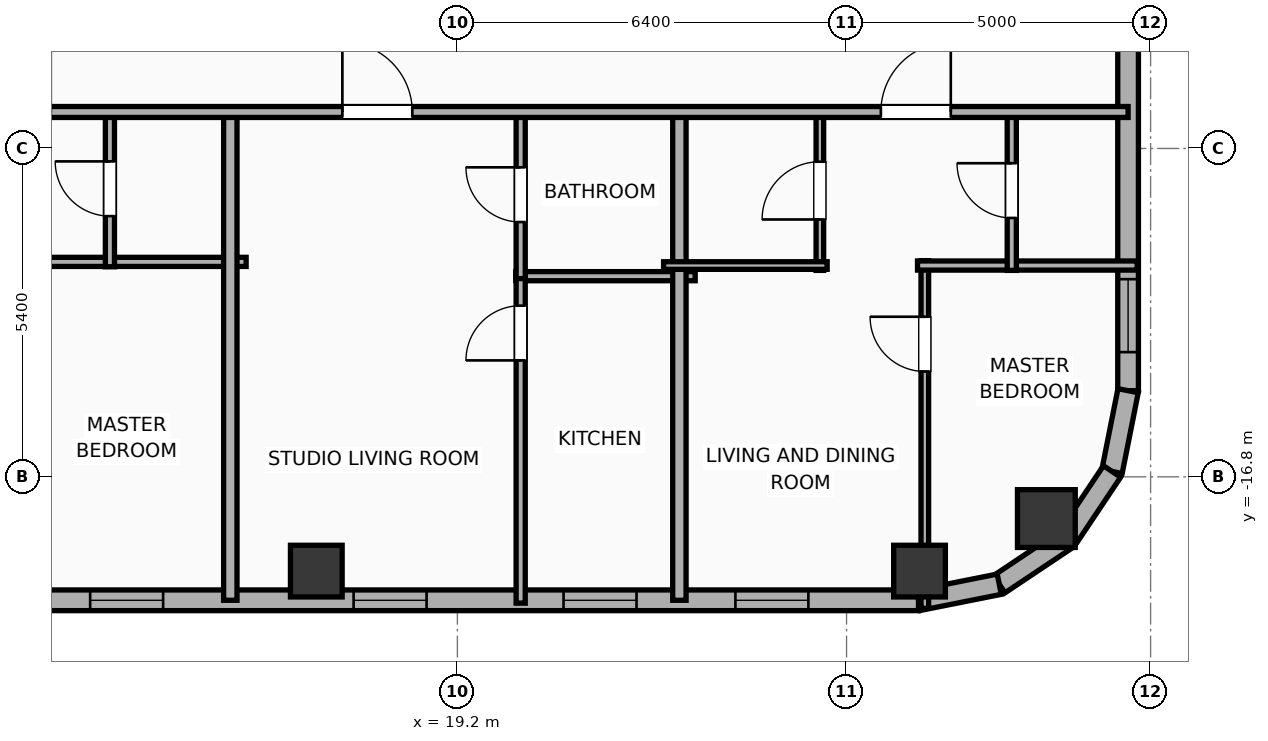
"""IFC4 building model, lengths in metres.
Left out: names, types, materials, properties, quantities, classifications, styles, units other than length and angle.
Written with IfcOpenShell. Run it as: python <this file> out.ifc"""

import sys

from ifc_helpers import new_model, si_unit, direction, frame, frame_2d, origin, origin_2d, place, context, subcontext, project, spatial, rectangle, hollow_rectangle, hollow_circle, extrude, element, fill, save


model = new_model("IFC4")
c1 = context("Model", 3, precision=1e-05, world=origin(), true_north=direction((0.0, 1.0)))
c2 = subcontext(c1, "Body", "Model", "MODEL_VIEW")
j1 = project(units=[si_unit("LENGTHUNIT", "METRE"), si_unit("PLANEANGLEUNIT", "RADIAN")], contexts=[c1])
p1 = place(None, origin())
s1 = spatial("IfcSite", under=j1, at=p1, CompositionType="ELEMENT")
p2 = place(p1, origin())
s2 = spatial("IfcBuilding", under=s1, at=p2, CompositionType="ELEMENT")
p3 = place(p2, frame((0.0, 0.0, 215.8)))
s3 = spatial("IfcBuildingStorey", under=s2, at=p3, CompositionType="ELEMENT", Elevation=215.8)
for number, where, z_axis, x_axis in (
    (1, (16.88, -18.35, 0.0), (0.0, 0.0, 1.0), (1.0, 0.0, 0.0)),
    (2, (26.8, -18.35, 0.0), (0.0, 0.0, 1.0), (1.0, 0.0, 0.0)),
):
    element("IfcColumn", number, at=place(p3, frame(where, z_axis=z_axis, x_axis=x_axis)), inside=s3, PredefinedType="COLUMN", context=c2, shape_type="SweptSolid", body=[
        extrude(hollow_rectangle(XDim=0.85, YDim=0.85, WallThickness=0.028, at=origin_2d()), origin(), (0.0, 0.0, 1.0), 3.9),
    ])
p4 = place(p3, frame((28.886, -17.486, 0.0), z_axis=(0.0, 0.0, 1.0), x_axis=(1.0, 0.0, 0.0)))
e3 = element("IfcColumn", 3, at=p4, inside=s3, PredefinedType="COLUMN", context=c2, shape_type="SweptSolid", body=[
    extrude(hollow_circle(Radius=0.475, WallThickness=0.032, at=origin_2d()), origin(), (0.0, 0.0, 1.0), 3.9),
])
p5 = place(p3, frame((26.783, -18.83, 0.0), z_axis=(0.0, 0.0, 1.0), x_axis=(-1.0, 0.0, 0.0)))
e4 = element("IfcWall", 4, at=p5, inside=s3, PredefinedType="ELEMENTEDWALL", context=c2, shape_type="SweptSolid", body=[
    extrude(rectangle(XDim=49.566, YDim=0.34, at=frame_2d((24.783, 0.0))), origin(), (0.0, 0.0, 1.0), 3.65),
])
p6 = place(p5, frame((23.583, 0.0, 0.75)))
e5 = element("IfcOpeningElement", 5, at=p6, cuts=e4, PredefinedType="OPENING", context=c2, shape_type="SweptSolid", body=[
    extrude(rectangle(XDim=2.4, YDim=2.1, at=frame_2d((1.2, 1.05))), frame((0.0, 0.18, 0.0), z_axis=(0.0, -1.0, 0.0), x_axis=(1.0, 0.0, 0.0)), (0.0, 0.0, 1.0), 0.36),
])
p7 = place(p5, frame((41.756, 0.0, 0.75)))
e6 = element("IfcOpeningElement", 6, at=p7, cuts=e4, PredefinedType="OPENING", context=c2, shape_type="SweptSolid", body=[
    extrude(rectangle(XDim=2.4, YDim=2.1, at=frame_2d((1.2, 1.05))), frame((0.0, 0.18, 0.0), z_axis=(0.0, -1.0, 0.0), x_axis=(1.0, 0.0, 0.0)), (0.0, 0.0, 1.0), 0.36),
])
p8 = place(p5, frame((47.222, 0.0, 0.75)))
e7 = element("IfcOpeningElement", 7, at=p8, cuts=e4, PredefinedType="OPENING", context=c2, shape_type="SweptSolid", body=[
    extrude(rectangle(XDim=1.2, YDim=2.05, at=frame_2d((0.6, 1.025))), frame((0.0, 0.18, 0.0), z_axis=(0.0, -1.0, 0.0), x_axis=(1.0, 0.0, 0.0)), (0.0, 0.0, 1.0), 0.36),
])
p9 = place(p5, frame((45.08, 0.0, 0.75)))
e8 = element("IfcOpeningElement", 8, at=p9, cuts=e4, PredefinedType="OPENING", context=c2, shape_type="SweptSolid", body=[
    extrude(rectangle(XDim=1.2, YDim=2.05, at=frame_2d((0.6, 1.025))), frame((0.0, 0.18, 0.0), z_axis=(0.0, -1.0, 0.0), x_axis=(1.0, 0.0, 0.0)), (0.0, 0.0, 1.0), 0.36),
])
p10 = place(p5, frame((37.289, 0.0, 0.75)))
e9 = element("IfcOpeningElement", 9, at=p10, cuts=e4, PredefinedType="OPENING", context=c2, shape_type="SweptSolid", body=[
    extrude(rectangle(XDim=1.2, YDim=2.05, at=frame_2d((0.6, 1.025))), frame((0.0, 0.18, 0.0), z_axis=(0.0, -1.0, 0.0), x_axis=(1.0, 0.0, 0.0)), (0.0, 0.0, 1.0), 0.36),
])
p11 = place(p5, frame((16.115, 0.0, 0.75)))
e10 = element("IfcOpeningElement", 10, at=p11, cuts=e4, PredefinedType="OPENING", context=c2, shape_type="SweptSolid", body=[
    extrude(rectangle(XDim=1.2, YDim=2.05, at=frame_2d((0.6, 1.025))), frame((0.0, 0.18, 0.0), z_axis=(0.0, -1.0, 0.0), x_axis=(1.0, 0.0, 0.0)), (0.0, 0.0, 1.0), 0.36),
])
p12 = place(p5, frame((12.422, 0.0, 0.75)))
e11 = element("IfcOpeningElement", 11, at=p12, cuts=e4, PredefinedType="OPENING", context=c2, shape_type="SweptSolid", body=[
    extrude(rectangle(XDim=1.2, YDim=2.05, at=frame_2d((0.6, 1.025))), frame((0.0, 0.18, 0.0), z_axis=(0.0, -1.0, 0.0), x_axis=(1.0, 0.0, 0.0)), (0.0, 0.0, 1.0), 0.36),
])
p13 = place(p5, frame((8.09, 0.0, 0.75)))
e12 = element("IfcOpeningElement", 12, at=p13, cuts=e4, PredefinedType="OPENING", context=c2, shape_type="SweptSolid", body=[
    extrude(rectangle(XDim=1.2, YDim=2.05, at=frame_2d((0.6, 1.025))), frame((0.0, 0.18, 0.0), z_axis=(0.0, -1.0, 0.0), x_axis=(1.0, 0.0, 0.0)), (0.0, 0.0, 1.0), 0.36),
])
p14 = place(p5, frame((4.637, 0.0, 0.75)))
e13 = element("IfcOpeningElement", 13, at=p14, cuts=e4, PredefinedType="OPENING", context=c2, shape_type="SweptSolid", body=[
    extrude(rectangle(XDim=1.2, YDim=2.05, at=frame_2d((0.6, 1.025))), frame((0.0, 0.18, 0.0), z_axis=(0.0, -1.0, 0.0), x_axis=(1.0, 0.0, 0.0)), (0.0, 0.0, 1.0), 0.36),
])
p15 = place(p5, frame((1.811, 0.0, 0.75)))
e14 = element("IfcOpeningElement", 14, at=p15, cuts=e4, PredefinedType="OPENING", context=c2, shape_type="SweptSolid", body=[
    extrude(rectangle(XDim=1.2, YDim=2.05, at=frame_2d((0.6, 1.025))), frame((0.0, 0.18, 0.0), z_axis=(0.0, -1.0, 0.0), x_axis=(1.0, 0.0, 0.0)), (0.0, 0.0, 1.0), 0.36),
])
p16 = place(p5, frame((32.253, 0.0, 0.75)))
e15 = element("IfcOpeningElement", 15, at=p16, cuts=e4, PredefinedType="OPENING", context=c2, shape_type="SweptSolid", body=[
    extrude(rectangle(XDim=1.2, YDim=2.05, at=frame_2d((0.6, 1.025))), frame((0.0, 0.18, 0.0), z_axis=(0.0, -1.0, 0.0), x_axis=(1.0, 0.0, 0.0)), (0.0, 0.0, 1.0), 0.36),
])
p17 = place(p5, frame((27.853, 0.0, 0.75)))
e16 = element("IfcOpeningElement", 16, at=p17, cuts=e4, PredefinedType="OPENING", context=c2, shape_type="SweptSolid", body=[
    extrude(rectangle(XDim=1.2, YDim=2.05, at=frame_2d((0.6, 1.025))), frame((0.0, 0.18, 0.0), z_axis=(0.0, -1.0, 0.0), x_axis=(1.0, 0.0, 0.0)), (0.0, 0.0, 1.0), 0.36),
])
p18 = place(p5, frame((20.473, 0.0, 0.75)))
e17 = element("IfcOpeningElement", 17, at=p18, cuts=e4, PredefinedType="OPENING", context=c2, shape_type="SweptSolid", body=[
    extrude(rectangle(XDim=1.2, YDim=2.05, at=frame_2d((0.6, 1.025))), frame((0.0, 0.18, 0.0), z_axis=(0.0, -1.0, 0.0), x_axis=(1.0, 0.0, 0.0)), (0.0, 0.0, 1.0), 0.36),
])
p19 = place(p3, frame((30.23, 16.583, 0.0), z_axis=(0.0, 0.0, 1.0), x_axis=(0.0, -1.0, 0.0)))
e18 = element("IfcWall", 18, at=p19, inside=s3, PredefinedType="ELEMENTEDWALL", context=c2, shape_type="SweptSolid", body=[
    extrude(rectangle(XDim=31.967, YDim=0.34, at=frame_2d((15.983, 0.0))), origin(), (0.0, 0.0, 1.0), 3.65),
])
p20 = place(p19, frame((30.132, 0.0, 0.75)))
e19 = element("IfcOpeningElement", 19, at=p20, cuts=e18, PredefinedType="OPENING", context=c2, shape_type="SweptSolid", body=[
    extrude(rectangle(XDim=1.2, YDim=2.05, at=frame_2d((0.6, 1.025))), frame((0.0, 0.18, 0.0), z_axis=(0.0, -1.0, 0.0), x_axis=(1.0, 0.0, 0.0)), (0.0, 0.0, 1.0), 0.36),
])
p21 = place(p19, frame((11.288, 0.0, 0.75)))
e20 = element("IfcOpeningElement", 20, at=p21, cuts=e18, PredefinedType="OPENING", context=c2, shape_type="SweptSolid", body=[
    extrude(rectangle(XDim=1.2, YDim=2.05, at=frame_2d((0.6, 1.025))), frame((0.0, 0.18, 0.0), z_axis=(0.0, -1.0, 0.0), x_axis=(1.0, 0.0, 0.0)), (0.0, 0.0, 1.0), 0.36),
])
p22 = place(p19, frame((20.538, 0.0, 0.75)))
e21 = element("IfcOpeningElement", 21, at=p22, cuts=e18, PredefinedType="OPENING", context=c2, shape_type="SweptSolid", body=[
    extrude(rectangle(XDim=1.2, YDim=2.05, at=frame_2d((0.6, 1.025))), frame((0.0, 0.18, 0.0), z_axis=(0.0, -1.0, 0.0), x_axis=(1.0, 0.0, 0.0)), (0.0, 0.0, 1.0), 0.36),
])
p23 = place(p3, frame((30.23, -15.383, 0.0), z_axis=(0.0, 0.0, 1.0), x_axis=(-0.195110379894, -0.98078129043, 0.0)))
e22 = element("IfcWall", 22, at=p23, inside=s3, PredefinedType="ELEMENTEDWALL", context=c2, shape_type="SweptSolid", body=[
    extrude(rectangle(XDim=1.354, YDim=0.34, at=frame_2d((0.677, 0.0))), origin(), (0.0, 0.0, 1.0), 3.65),
])
p24 = place(p3, frame((29.966, -16.711, 0.0), z_axis=(0.0, 0.0, 1.0), x_axis=(-0.555584683399, -0.831459956686, 0.0)))
e23 = element("IfcWall", 23, at=p24, inside=s3, PredefinedType="ELEMENTEDWALL", context=c2, shape_type="SweptSolid", body=[
    extrude(rectangle(XDim=1.337, YDim=0.34, at=frame_2d((0.668, 0.0))), origin(), (0.0, 0.0, 1.0), 3.65),
])
p25 = place(p3, frame((29.223, -17.823, 0.0), z_axis=(0.0, 0.0, 1.0), x_axis=(-0.831403586725, -0.555669034571, 0.0)))
e24 = element("IfcWall", 24, at=p25, inside=s3, PredefinedType="ELEMENTEDWALL", context=c2, shape_type="SweptSolid", body=[
    extrude(rectangle(XDim=1.337, YDim=0.34, at=frame_2d((0.668, 0.0))), origin(), (0.0, 0.0, 1.0), 3.65),
])
p26 = place(p3, frame((28.111, -18.566, 0.0), z_axis=(0.0, 0.0, 1.0), x_axis=(-0.980788153188, -0.195075878998, 0.0)))
e25 = element("IfcWall", 25, at=p26, inside=s3, PredefinedType="ELEMENTEDWALL", context=c2, shape_type="SweptSolid", body=[
    extrude(rectangle(XDim=1.354, YDim=0.34, at=frame_2d((0.677, 0.0))), origin(), (0.0, 0.0, 1.0), 3.65),
])
p27 = place(p3, frame((11.936, -13.265, 0.0), z_axis=(0.0, 0.0, 1.0), x_axis=(1.0, 0.0, 0.0)))
e26 = element("IfcWall", 26, at=p27, inside=s3, PredefinedType="PLUMBINGWALL", context=c2, shape_type="SweptSolid", body=[
    extrude(rectangle(XDim=3.79, YDim=0.15, at=frame_2d((1.895, 0.0))), origin(), (0.0, 0.0, 1.0), 3.65),
])
p28 = place(p3, frame((13.486, -13.345, 0.0), z_axis=(0.0, 0.0, 1.0), x_axis=(0.0, 1.0, 0.0)))
e27 = element("IfcWall", 27, at=p28, inside=s3, PredefinedType="PLUMBINGWALL", context=c2, shape_type="SweptSolid", body=[
    extrude(rectangle(XDim=2.565, YDim=0.15, at=frame_2d((1.282, 0.0))), origin(), (0.0, 0.0, 1.0), 3.65),
])
p29 = place(p28, frame((0.833, 0.0, 0.0)))
e28 = element("IfcOpeningElement", 28, at=p29, cuts=e27, PredefinedType="OPENING", context=c2, shape_type="SweptSolid", body=[
    extrude(rectangle(XDim=0.9, YDim=2.05, at=frame_2d((0.45, 1.025))), frame((0.0, 0.085, 0.0), z_axis=(0.0, -1.0, 0.0), x_axis=(1.0, 0.0, 0.0)), (0.0, 0.0, 1.0), 0.17),
])
p30 = place(p3, frame((15.466, -18.83, 0.0), z_axis=(0.0, 0.0, 1.0), x_axis=(0.0, 1.0, 0.0)))
e29 = element("IfcWall", 29, at=p30, inside=s3, PredefinedType="PARTITIONING", context=c2, shape_type="SweptSolid", body=[
    extrude(rectangle(XDim=8.11, YDim=0.22, at=frame_2d((4.055, 0.0))), origin(), (0.0, 0.0, 1.0), 3.65),
])
p31 = place(p3, frame((20.161, -13.5, 0.0), z_axis=(0.0, 0.0, 1.0), x_axis=(1.0, 0.0, 0.0)))
e30 = element("IfcWall", 30, at=p31, inside=s3, PredefinedType="PLUMBINGWALL", context=c2, shape_type="SweptSolid", body=[
    extrude(rectangle(XDim=2.95, YDim=0.15, at=frame_2d((1.475, 0.0))), origin(), (0.0, 0.0, 1.0), 3.65),
])
p32 = place(p3, frame((20.241, -18.877, 0.0), z_axis=(0.0, 0.0, 1.0), x_axis=(0.0, 1.0, 0.0)))
e31 = element("IfcWall", 31, at=p32, inside=s3, PredefinedType="PLUMBINGWALL", context=c2, shape_type="SweptSolid", body=[
    extrude(rectangle(XDim=5.417, YDim=0.15, at=frame_2d((2.708, 0.0))), origin(), (0.0, 0.0, 1.0), 3.65),
])
p33 = place(p32, frame((3.992, 0.0, 0.0)))
e32 = element("IfcOpeningElement", 32, at=p33, cuts=e31, PredefinedType="OPENING", context=c2, shape_type="SweptSolid", body=[
    extrude(rectangle(XDim=0.9, YDim=2.05, at=frame_2d((0.45, 1.025))), frame((0.0, 0.085, 0.0), z_axis=(0.0, -1.0, 0.0), x_axis=(1.0, 0.0, 0.0)), (0.0, 0.0, 1.0), 0.17),
])
p34 = place(p3, frame((20.241, -13.54, 0.0), z_axis=(0.0, 0.0, 1.0), x_axis=(0.0, 1.0, 0.0)))
e33 = element("IfcWall", 33, at=p34, inside=s3, PredefinedType="PLUMBINGWALL", context=c2, shape_type="SweptSolid", body=[
    extrude(rectangle(XDim=2.76, YDim=0.15, at=frame_2d((1.38, 0.0))), origin(), (0.0, 0.0, 1.0), 3.65),
])
p35 = place(p34, frame((0.93, 0.0, 0.0)))
e34 = element("IfcOpeningElement", 34, at=p35, cuts=e33, PredefinedType="OPENING", context=c2, shape_type="SweptSolid", body=[
    extrude(rectangle(XDim=0.9, YDim=2.05, at=frame_2d((0.45, 1.025))), frame((0.0, 0.085, 0.0), z_axis=(0.0, -1.0, 0.0), x_axis=(1.0, 0.0, 0.0)), (0.0, 0.0, 1.0), 0.17),
])
p36 = place(p3, frame((22.851, -18.83, 0.0), z_axis=(0.0, 0.0, 1.0), x_axis=(0.0, 1.0, 0.0)))
e35 = element("IfcWall", 35, at=p36, inside=s3, PredefinedType="PARTITIONING", context=c2, shape_type="SweptSolid", body=[
    extrude(rectangle(XDim=8.11, YDim=0.22, at=frame_2d((4.055, 0.0))), origin(), (0.0, 0.0, 1.0), 3.65),
])
p37 = place(p3, frame((26.887, -18.962, 0.0), z_axis=(0.0, 0.0, 1.0), x_axis=(0.0, 1.0, 0.0)))
e36 = element("IfcWall", 36, at=p37, inside=s3, PredefinedType="PARTITIONING", context=c2, shape_type="SweptSolid", body=[
    extrude(rectangle(XDim=5.717, YDim=0.125, at=frame_2d((2.859, 0.0))), origin(), (0.0, 0.0, 1.0), 3.65),
])
p38 = place(p37, frame((3.895, 0.0, 0.0)))
e37 = element("IfcOpeningElement", 37, at=p38, cuts=e36, PredefinedType="OPENING", context=c2, shape_type="SweptSolid", body=[
    extrude(rectangle(XDim=0.9, YDim=2.05, at=frame_2d((0.45, 1.025))), frame((0.0, 0.073, 0.0), z_axis=(0.0, -1.0, 0.0), x_axis=(1.0, 0.0, 0.0)), (0.0, 0.0, 1.0), 0.145),
])
p39 = place(p3, frame((26.767, -13.325, 0.0), z_axis=(0.0, 0.0, 1.0), x_axis=(1.0, 0.0, 0.0)))
e38 = element("IfcWall", 38, at=p39, inside=s3, PredefinedType="PLUMBINGWALL", context=c2, shape_type="SweptSolid", body=[
    extrude(rectangle(XDim=3.613, YDim=0.15, at=frame_2d((1.806, 0.0))), origin(), (0.0, 0.0, 1.0), 3.65),
])
p40 = place(p3, frame((25.161, -13.405, 0.0), z_axis=(0.0, 0.0, 1.0), x_axis=(0.0, 1.0, 0.0)))
e39 = element("IfcWall", 39, at=p40, inside=s3, PredefinedType="PARTITIONING", context=c2, shape_type="SweptSolid", body=[
    extrude(rectangle(XDim=2.625, YDim=0.125, at=frame_2d((1.312, 0.0))), origin(), (0.0, 0.0, 1.0), 3.65),
])
p41 = place(p40, frame((0.837, 0.0, 0.0)))
e40 = element("IfcOpeningElement", 40, at=p41, cuts=e39, PredefinedType="OPENING", context=c2, shape_type="SweptSolid", body=[
    extrude(rectangle(XDim=0.95, YDim=2.05, at=frame_2d((0.475, 1.025))), frame((0.0, 0.073, 0.0), z_axis=(0.0, -1.0, 0.0), x_axis=(1.0, 0.0, 0.0)), (0.0, 0.0, 1.0), 0.145),
])
p42 = place(p3, frame((22.591, -13.325, 0.0), z_axis=(0.0, 0.0, 1.0), x_axis=(1.0, 0.0, 0.0)))
e41 = element("IfcWall", 41, at=p42, inside=s3, PredefinedType="PARTITIONING", context=c2, shape_type="SweptSolid", body=[
    extrude(rectangle(XDim=2.69, YDim=0.125, at=frame_2d((1.345, 0.0))), origin(), (0.0, 0.0, 1.0), 3.65),
])
p43 = place(p3, frame((28.317, -13.405, 0.0), z_axis=(0.0, 0.0, 1.0), x_axis=(0.0, 1.0, 0.0)))
e42 = element("IfcWall", 42, at=p43, inside=s3, PredefinedType="PLUMBINGWALL", context=c2, shape_type="SweptSolid", body=[
    extrude(rectangle(XDim=2.625, YDim=0.15, at=frame_2d((1.312, 0.0))), origin(), (0.0, 0.0, 1.0), 3.65),
])
p44 = place(p43, frame((0.863, 0.0, 0.0)))
e43 = element("IfcOpeningElement", 43, at=p44, cuts=e42, PredefinedType="OPENING", context=c2, shape_type="SweptSolid", body=[
    extrude(rectangle(XDim=0.9, YDim=2.05, at=frame_2d((0.45, 1.025))), frame((0.0, 0.085, 0.0), z_axis=(0.0, -1.0, 0.0), x_axis=(1.0, 0.0, 0.0)), (0.0, 0.0, 1.0), 0.17),
])
p45 = place(p3, frame((8.08, -10.8, 0.0), z_axis=(0.0, 0.0, 1.0), x_axis=(1.0, 0.0, 0.0)))
e44 = element("IfcWall", 44, at=p45, inside=s3, PredefinedType="PARTITIONING", context=c2, shape_type="SweptSolid", body=[
    extrude(rectangle(XDim=22.15, YDim=0.18, at=frame_2d((11.075, 0.0))), origin(), (0.0, 0.0, 1.0), 3.65),
])
p46 = place(p45, frame((3.283, 0.0, 0.0)))
e45 = element("IfcOpeningElement", 45, at=p46, cuts=e44, PredefinedType="OPENING", context=c2, shape_type="SweptSolid", body=[
    extrude(rectangle(XDim=1.15, YDim=2.05, at=frame_2d((0.575, 1.025))), frame((0.0, 0.1, 0.0), z_axis=(0.0, -1.0, 0.0), x_axis=(1.0, 0.0, 0.0)), (0.0, 0.0, 1.0), 0.2),
])
p47 = place(p45, frame((9.229, 0.0, 0.0)))
e46 = element("IfcOpeningElement", 46, at=p47, cuts=e44, PredefinedType="OPENING", context=c2, shape_type="SweptSolid", body=[
    extrude(rectangle(XDim=1.15, YDim=2.05, at=frame_2d((0.575, 1.025))), frame((0.0, 0.1, 0.0), z_axis=(0.0, -1.0, 0.0), x_axis=(1.0, 0.0, 0.0)), (0.0, 0.0, 1.0), 0.2),
])
p48 = place(p45, frame((18.084, 0.0, 0.0)))
e47 = element("IfcOpeningElement", 47, at=p48, cuts=e44, PredefinedType="OPENING", context=c2, shape_type="SweptSolid", body=[
    extrude(rectangle(XDim=1.15, YDim=2.05, at=frame_2d((0.575, 1.025))), frame((0.0, 0.1, 0.0), z_axis=(0.0, -1.0, 0.0), x_axis=(1.0, 0.0, 0.0)), (0.0, 0.0, 1.0), 0.2),
])
p49 = place(p12, origin())
e48 = element("IfcWindow", 48, at=p49, inside=s3, PartitioningType="SINGLE_PANEL", PredefinedType="WINDOW", context=c2, shape_type="SweptSolid", body=[
    extrude(rectangle(XDim=1.2, YDim=2.05, at=frame_2d((0.6, 1.025))), frame((0.0, 0.03, 0.0), z_axis=(0.0, -1.0, 0.0), x_axis=(1.0, 0.0, 0.0)), (0.0, 0.0, 1.0), 0.06),
])
fill(e11, e48)
p50 = place(p13, origin())
e49 = element("IfcWindow", 49, at=p50, inside=s3, PartitioningType="SINGLE_PANEL", PredefinedType="WINDOW", context=c2, shape_type="SweptSolid", body=[
    extrude(rectangle(XDim=1.2, YDim=2.05, at=frame_2d((0.6, 1.025))), frame((0.0, 0.03, 0.0), z_axis=(0.0, -1.0, 0.0), x_axis=(1.0, 0.0, 0.0)), (0.0, 0.0, 1.0), 0.06),
])
fill(e12, e49)
p51 = place(p14, origin())
e50 = element("IfcWindow", 50, at=p51, inside=s3, PartitioningType="SINGLE_PANEL", PredefinedType="WINDOW", context=c2, shape_type="SweptSolid", body=[
    extrude(rectangle(XDim=1.2, YDim=2.05, at=frame_2d((0.6, 1.025))), frame((0.0, 0.03, 0.0), z_axis=(0.0, -1.0, 0.0), x_axis=(1.0, 0.0, 0.0)), (0.0, 0.0, 1.0), 0.06),
])
fill(e13, e50)
p52 = place(p15, origin())
e51 = element("IfcWindow", 51, at=p52, inside=s3, PartitioningType="SINGLE_PANEL", PredefinedType="WINDOW", context=c2, shape_type="SweptSolid", body=[
    extrude(rectangle(XDim=1.2, YDim=2.05, at=frame_2d((0.6, 1.025))), frame((0.0, 0.03, 0.0), z_axis=(0.0, -1.0, 0.0), x_axis=(1.0, 0.0, 0.0)), (0.0, 0.0, 1.0), 0.06),
])
fill(e14, e51)
p53 = place(p20, origin())
e52 = element("IfcWindow", 52, at=p53, inside=s3, PartitioningType="SINGLE_PANEL", PredefinedType="WINDOW", context=c2, shape_type="SweptSolid", body=[
    extrude(rectangle(XDim=1.2, YDim=2.05, at=frame_2d((0.6, 1.025))), frame((0.0, 0.03, 0.0), z_axis=(0.0, -1.0, 0.0), x_axis=(1.0, 0.0, 0.0)), (0.0, 0.0, 1.0), 0.06),
])
fill(e19, e52)
p54 = place(p29, origin())
e53 = element("IfcDoor", 53, at=p54, inside=s3, OperationType="SINGLE_SWING_RIGHT", PredefinedType="DOOR", context=c2, shape_type="SweptSolid", body=[
    extrude(rectangle(XDim=0.9, YDim=2.05, at=frame_2d((0.45, 1.025))), frame((0.0, 0.025, 0.0), z_axis=(0.0, -1.0, 0.0), x_axis=(1.0, 0.0, 0.0)), (0.0, 0.0, 1.0), 0.05),
])
fill(e28, e53)
p55 = place(p33, origin())
e54 = element("IfcDoor", 54, at=p55, inside=s3, OperationType="SINGLE_SWING_LEFT", PredefinedType="DOOR", context=c2, shape_type="SweptSolid", body=[
    extrude(rectangle(XDim=0.9, YDim=2.05, at=frame_2d((0.45, 1.025))), frame((0.0, 0.025, 0.0), z_axis=(0.0, -1.0, 0.0), x_axis=(1.0, 0.0, 0.0)), (0.0, 0.0, 1.0), 0.05),
])
fill(e32, e54)
p56 = place(p35, origin())
e55 = element("IfcDoor", 55, at=p56, inside=s3, OperationType="SINGLE_SWING_RIGHT", PredefinedType="DOOR", context=c2, shape_type="SweptSolid", body=[
    extrude(rectangle(XDim=0.9, YDim=2.05, at=frame_2d((0.45, 1.025))), frame((0.0, 0.025, 0.0), z_axis=(0.0, -1.0, 0.0), x_axis=(1.0, 0.0, 0.0)), (0.0, 0.0, 1.0), 0.05),
])
fill(e34, e55)
p57 = place(p38, origin())
e56 = element("IfcDoor", 56, at=p57, inside=s3, OperationType="SINGLE_SWING_RIGHT", PredefinedType="DOOR", context=c2, shape_type="SweptSolid", body=[
    extrude(rectangle(XDim=0.9, YDim=2.05, at=frame_2d((0.45, 1.025))), frame((0.0, 0.025, 0.0), z_axis=(0.0, -1.0, 0.0), x_axis=(1.0, 0.0, 0.0)), (0.0, 0.0, 1.0), 0.05),
])
fill(e37, e56)
p58 = place(p41, origin())
e57 = element("IfcDoor", 57, at=p58, inside=s3, OperationType="SINGLE_SWING_LEFT", PredefinedType="DOOR", context=c2, shape_type="SweptSolid", body=[
    extrude(rectangle(XDim=0.95, YDim=2.05, at=frame_2d((0.475, 1.025))), frame((0.0, 0.025, 0.0), z_axis=(0.0, -1.0, 0.0), x_axis=(1.0, 0.0, 0.0)), (0.0, 0.0, 1.0), 0.05),
])
fill(e40, e57)
p59 = place(p44, origin())
e58 = element("IfcDoor", 58, at=p59, inside=s3, OperationType="SINGLE_SWING_RIGHT", PredefinedType="DOOR", context=c2, shape_type="SweptSolid", body=[
    extrude(rectangle(XDim=0.9, YDim=2.05, at=frame_2d((0.45, 1.025))), frame((0.0, 0.025, 0.0), z_axis=(0.0, -1.0, 0.0), x_axis=(1.0, 0.0, 0.0)), (0.0, 0.0, 1.0), 0.05),
])
fill(e43, e58)
p60 = place(p47, origin())
e59 = element("IfcDoor", 59, at=p60, inside=s3, OperationType="SINGLE_SWING_LEFT", PredefinedType="DOOR", context=c2, shape_type="SweptSolid", body=[
    extrude(rectangle(XDim=1.15, YDim=2.05, at=frame_2d((0.575, 1.025))), frame((0.0, 0.025, 0.0), z_axis=(0.0, -1.0, 0.0), x_axis=(1.0, 0.0, 0.0)), (0.0, 0.0, 1.0), 0.05),
])
fill(e46, e59)
p61 = place(p48, origin())
e60 = element("IfcDoor", 60, at=p61, inside=s3, OperationType="SINGLE_SWING_RIGHT", PredefinedType="DOOR", context=c2, shape_type="SweptSolid", body=[
    extrude(rectangle(XDim=1.15, YDim=2.05, at=frame_2d((0.575, 1.025))), frame((0.0, 0.025, 0.0), z_axis=(0.0, -1.0, 0.0), x_axis=(1.0, 0.0, 0.0)), (0.0, 0.0, 1.0), 0.05),
])
fill(e47, e60)
save(model, sys.argv[1])
